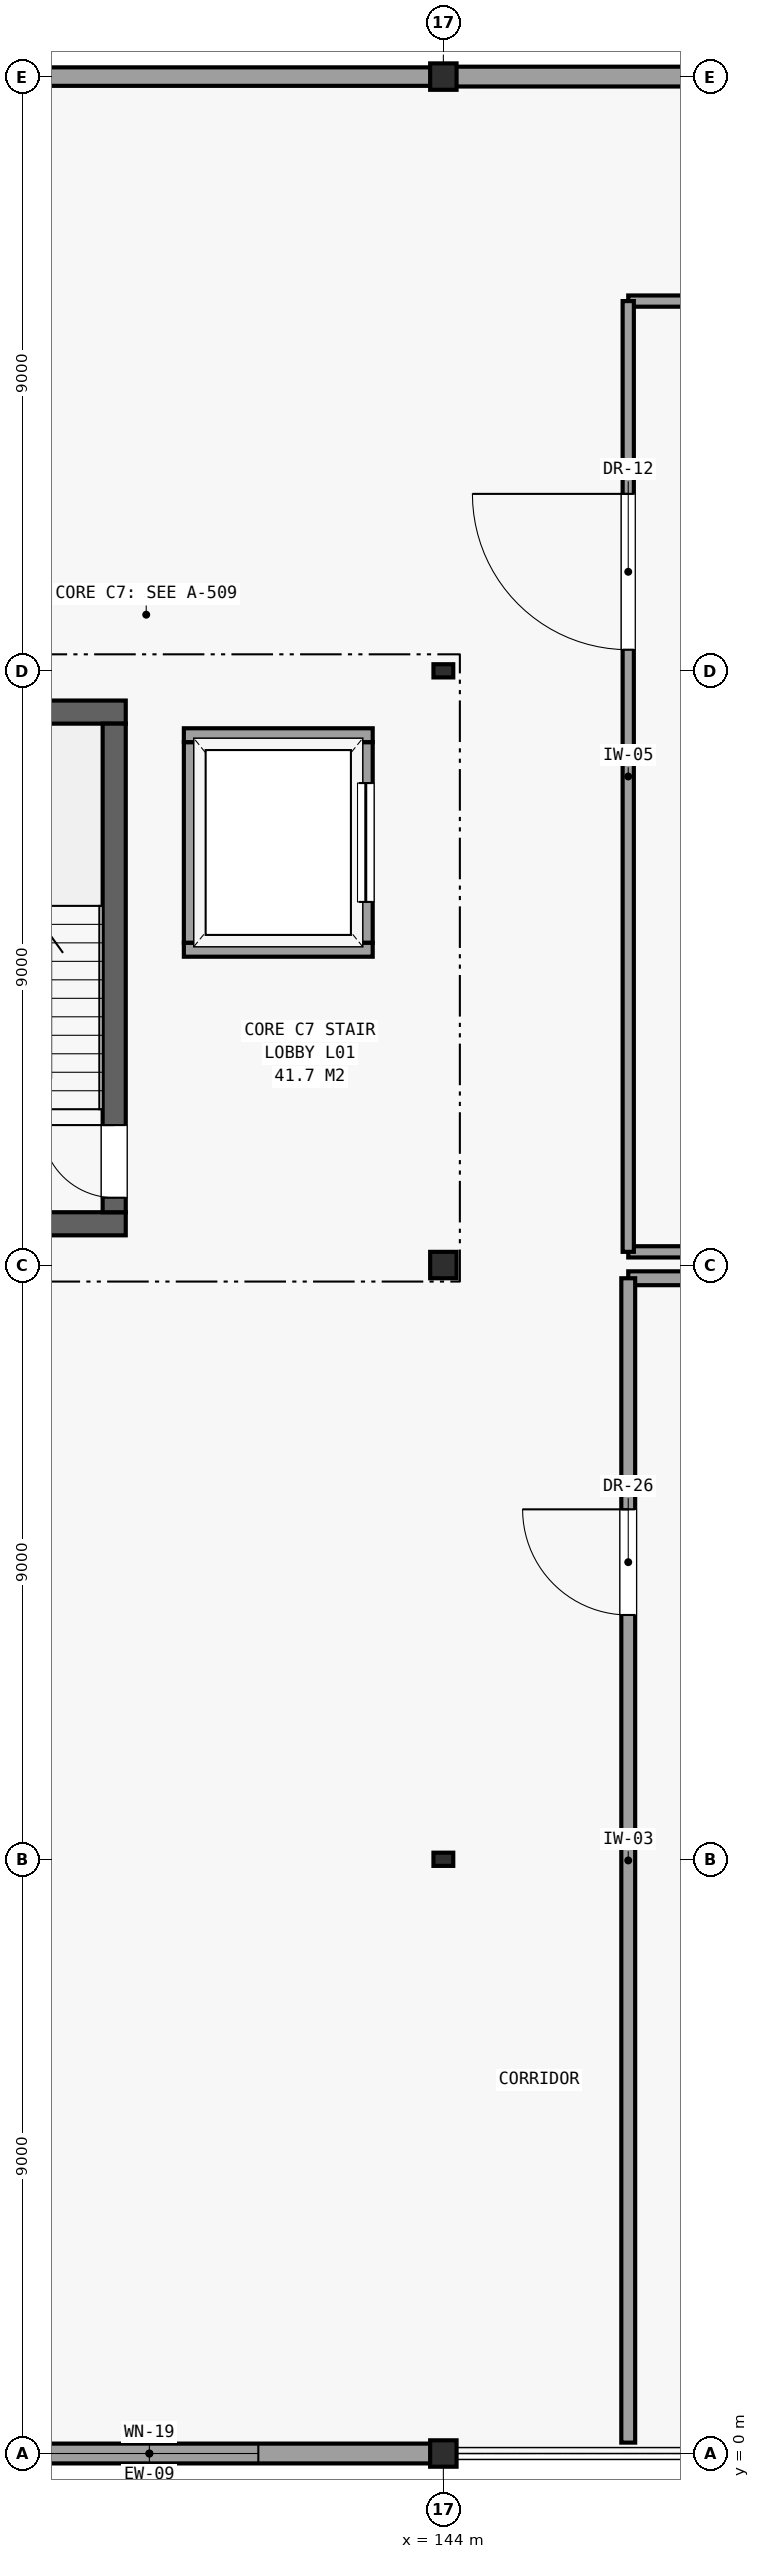
"""IFC4 building model, lengths in metres.
Left out: names, types, materials, properties, quantities, classifications, styles, units other than length and angle.
Written with IfcOpenShell. Run it as: python <this file> out.ifc"""

import sys

from ifc_helpers import new_model, si_unit, direction, frame, frame_2d, origin, origin_2d, place, context, subcontext, project, spatial, rectangle, hollow_rectangle, i_section, extrude, element, fill, save


model = new_model("IFC4")
c1 = context("Model", 3, precision=1e-05, world=origin(), true_north=direction((0.0, 1.0)))
c2 = subcontext(c1, "Body", "Model", "MODEL_VIEW")
j1 = project(units=[si_unit("LENGTHUNIT", "METRE"), si_unit("PLANEANGLEUNIT", "RADIAN")], contexts=[c1])
p1 = place(None, origin())
s1 = spatial("IfcSite", under=j1, at=p1, CompositionType="ELEMENT")
p2 = place(p1, origin())
s2 = spatial("IfcBuilding", under=s1, at=p2, CompositionType="ELEMENT")
p3 = place(p2, frame((0.0, 0.0, 5.1)))
s3 = spatial("IfcBuildingStorey", under=s2, at=p3, CompositionType="ELEMENT", Elevation=5.1)
p4 = place(p3, frame((144.0, 0.0, 0.0), z_axis=(0.0, 0.0, 1.0), x_axis=(1.0, 0.0, 0.0)))
e1 = element("IfcColumn", 1, at=p4, inside=s3, PredefinedType="COLUMN", context=c2, shape_type="SweptSolid", body=[
    extrude(i_section(OverallWidth=0.4, OverallDepth=0.4, WebThickness=0.013, FlangeThickness=0.021, FilletRadius=0.016, at=origin_2d()), origin(), (0.0, 0.0, 1.0), 4.14),
])
p5 = place(p3, frame((144.0, 9.0, 0.0), z_axis=(0.0, 0.0, 1.0), x_axis=(1.0, 0.0, 0.0)))
e2 = element("IfcColumn", 2, at=p5, inside=s3, PredefinedType="COLUMN", context=c2, shape_type="SweptSolid", body=[
    extrude(hollow_rectangle(XDim=0.2, YDim=0.3, WallThickness=0.012, at=origin_2d()), origin(), (0.0, 0.0, 1.0), 4.2),
])
p6 = place(p3, frame((144.0, 18.0, 0.0), z_axis=(0.0, 0.0, 1.0), x_axis=(1.0, 0.0, 0.0)))
e3 = element("IfcColumn", 3, at=p6, inside=s3, PredefinedType="COLUMN", context=c2, shape_type="SweptSolid", body=[
    extrude(i_section(OverallWidth=0.4, OverallDepth=0.4, WebThickness=0.013, FlangeThickness=0.021, FilletRadius=0.016, at=origin_2d()), origin(), (0.0, 0.0, 1.0), 4.2),
])
p7 = place(p3, frame((144.0, 27.0, 0.0), z_axis=(0.0, 0.0, 1.0), x_axis=(1.0, 0.0, 0.0)))
e4 = element("IfcColumn", 4, at=p7, inside=s3, PredefinedType="COLUMN", context=c2, shape_type="SweptSolid", body=[
    extrude(hollow_rectangle(XDim=0.2, YDim=0.3, WallThickness=0.012, at=origin_2d()), origin(), (0.0, 0.0, 1.0), 4.2),
])
p8 = place(p3, frame((144.0, 36.0, 0.0), z_axis=(0.0, 0.0, 1.0), x_axis=(1.0, 0.0, 0.0)))
e5 = element("IfcColumn", 5, at=p8, inside=s3, PredefinedType="COLUMN", context=c2, shape_type="SweptSolid", body=[
    extrude(i_section(OverallWidth=0.4, OverallDepth=0.4, WebThickness=0.013, FlangeThickness=0.021, FilletRadius=0.016, at=origin_2d()), origin(), (0.0, 0.0, 1.0), 4.2),
])
p9 = place(p3, frame((135.1, 0.0, 0.0), z_axis=(0.0, 0.0, 1.0), x_axis=(1.0, 0.0, 0.0)))
e6 = element("IfcWall", 6, at=p9, inside=s3, PredefinedType="SOLIDWALL", context=c2, shape_type="SweptSolid", body=[
    extrude(rectangle(XDim=8.896, YDim=0.3, at=frame_2d((4.448, 0.0))), origin(), (0.0, 0.0, 1.0), 3.29),
])
p10 = place(p9, frame((2.798, 0.0, 0.95)))
e7 = element("IfcOpeningElement", 7, at=p10, cuts=e6, PredefinedType="OPENING", context=c2, shape_type="SweptSolid", body=[
    extrude(rectangle(XDim=3.3, YDim=1.4, at=frame_2d((1.65, 0.7))), frame((0.0, 0.161, 0.0), z_axis=(0.0, -1.0, 0.0), x_axis=(1.0, 0.0, 0.0)), (0.0, 0.0, 1.0), 0.322),
])
p11 = place(p3, frame((152.9, 36.0, 0.0), z_axis=(0.0, 0.0, 1.0), x_axis=(-1.0, 0.0, 0.0)))
e8 = element("IfcWall", 8, at=p11, inside=s3, PredefinedType="SOLIDWALL", context=c2, shape_type="SweptSolid", body=[
    extrude(rectangle(XDim=8.896, YDim=0.3, at=frame_2d((4.448, 0.0))), origin(), (0.0, 0.0, 1.0), 3.3),
])
p12 = place(p3, frame((143.996, 36.0, 0.0), z_axis=(0.0, 0.0, 1.0), x_axis=(-1.0, 0.0, 0.0)))
e9 = element("IfcWall", 9, at=p12, inside=s3, PredefinedType="SOLIDWALL", context=c2, shape_type="SweptSolid", body=[
    extrude(rectangle(XDim=8.896, YDim=0.28, at=frame_2d((4.448, 0.0))), origin(), (0.0, 0.0, 1.0), 3.3),
])
for number, where, z_axis, x_axis in (
    (10, (135.21, 18.625, 0.0), (0.0, 0.0, 1.0), (1.0, 0.0, 0.0)),
    (11, (135.21, 26.375, 0.0), (0.0, 0.0, 1.0), (1.0, 0.0, 0.0)),
):
    element("IfcWall", number, at=place(p3, frame(where, z_axis=z_axis, x_axis=x_axis)), inside=s3, PredefinedType="SHEAR", context=c2, shape_type="SweptSolid", body=[
        extrude(rectangle(XDim=3.98, YDim=0.35, at=frame_2d((1.99, 0.0))), origin(), (0.0, 0.0, 1.0), 3.95),
    ])
p13 = place(p3, frame((139.015, 18.8, 0.0), z_axis=(0.0, 0.0, 1.0), x_axis=(0.0, 1.0, 0.0)))
e12 = element("IfcWall", 12, at=p13, inside=s3, PredefinedType="SHEAR", context=c2, shape_type="SweptSolid", body=[
    extrude(rectangle(XDim=7.4, YDim=0.35, at=frame_2d((3.7, 0.0))), origin(), (0.0, 0.0, 1.0), 3.95),
])
p14 = place(p13, frame((0.22, 0.0, 0.0)))
e13 = element("IfcOpeningElement", 13, at=p14, cuts=e12, PredefinedType="OPENING", context=c2, shape_type="SweptSolid", body=[
    extrude(rectangle(XDim=1.1, YDim=2.15, at=frame_2d((0.55, 1.075))), frame((0.0, 0.186, 0.0), z_axis=(0.0, -1.0, 0.0), x_axis=(1.0, 0.0, 0.0)), (0.0, 0.0, 1.0), 0.372),
])
p15 = place(p3, frame((142.825, 22.88, 0.0), z_axis=(0.0, 0.0, 1.0), x_axis=(0.0, 1.0, 0.0)))
e14 = element("IfcWall", 14, at=p15, inside=s3, PredefinedType="PARTITIONING", context=c2, shape_type="SweptSolid", body=[
    extrude(rectangle(XDim=3.04, YDim=0.21, at=frame_2d((1.52, 0.0))), origin(), (0.0, 0.0, 1.0), 3.95),
])
p16 = place(p15, frame((0.62, 0.0, 0.0)))
e15 = element("IfcOpeningElement", 15, at=p16, cuts=e14, PredefinedType="OPENING", context=c2, shape_type="SweptSolid", body=[
    extrude(rectangle(XDim=1.8, YDim=2.4, at=frame_2d((0.9, 1.2))), frame((0.0, 0.116, 0.0), z_axis=(0.0, -1.0, 0.0), x_axis=(1.0, 0.0, 0.0)), (0.0, 0.0, 1.0), 0.232),
])
p17 = place(p3, frame((140.175, 22.88, 0.0), z_axis=(0.0, 0.0, 1.0), x_axis=(0.0, 1.0, 0.0)))
e16 = element("IfcWall", 16, at=p17, inside=s3, PredefinedType="PARTITIONING", context=c2, shape_type="SweptSolid", body=[
    extrude(rectangle(XDim=3.04, YDim=0.21, at=frame_2d((1.52, 0.0))), origin(), (0.0, 0.0, 1.0), 3.95),
])
for number, where, z_axis, x_axis in (
    (17, (140.07, 22.775, 0.0), (0.0, 0.0, 1.0), (1.0, 0.0, 0.0)),
    (18, (140.07, 26.025, 0.0), (0.0, 0.0, 1.0), (1.0, 0.0, 0.0)),
):
    element("IfcWall", number, at=place(p3, frame(where, z_axis=z_axis, x_axis=x_axis)), inside=s3, PredefinedType="PARTITIONING", context=c2, shape_type="SweptSolid", body=[
        extrude(rectangle(XDim=2.86, YDim=0.21, at=frame_2d((1.43, 0.0))), origin(), (0.0, 0.0, 1.0), 3.95),
    ])
p18 = place(p3, frame((146.8, 18.2, 0.0), z_axis=(0.0, 0.0, 1.0), x_axis=(1.0, 0.0, 0.0)))
e19 = element("IfcWall", 19, at=p18, inside=s3, PredefinedType="PARTITIONING", context=c2, shape_type="SweptSolid", body=[
    extrude(rectangle(XDim=6.1, YDim=0.17, at=frame_2d((3.05, 0.0))), origin(), (0.0, 0.0, 1.0), 3.3),
])
p19 = place(p3, frame((146.8, 32.6, 0.0), z_axis=(0.0, 0.0, 1.0), x_axis=(1.0, 0.0, 0.0)))
e20 = element("IfcWall", 20, at=p19, inside=s3, PredefinedType="PARTITIONING", context=c2, shape_type="SweptSolid", body=[
    extrude(rectangle(XDim=14.8, YDim=0.17, at=frame_2d((7.4, 0.0))), origin(), (0.0, 0.0, 1.0), 3.3),
])
p20 = place(p3, frame((146.8, 18.2, 0.0), z_axis=(0.0, 0.0, 1.0), x_axis=(0.0, 1.0, 0.0)))
e21 = element("IfcWall", 21, at=p20, inside=s3, PredefinedType="PARTITIONING", context=c2, shape_type="SweptSolid", body=[
    extrude(rectangle(XDim=14.4, YDim=0.17, at=frame_2d((7.2, 0.0))), origin(), (0.0, 0.0, 1.0), 3.35),
])
p21 = place(p20, frame((9.12, 0.0, 0.0)))
e22 = element("IfcOpeningElement", 22, at=p21, cuts=e21, PredefinedType="OPENING", context=c2, shape_type="SweptSolid", body=[
    extrude(rectangle(XDim=2.36, YDim=2.879, at=frame_2d((1.18, 1.439))), frame((0.0, 0.096, 0.0), z_axis=(0.0, -1.0, 0.0), x_axis=(1.0, 0.0, 0.0)), (0.0, 0.0, 1.0), 0.192),
])
p22 = place(p3, frame((146.8, 17.8, 0.0), z_axis=(0.0, 0.0, 1.0), x_axis=(1.0, 0.0, 0.0)))
e23 = element("IfcWall", 23, at=p22, inside=s3, PredefinedType="PARTITIONING", context=c2, shape_type="SweptSolid", body=[
    extrude(rectangle(XDim=6.1, YDim=0.21, at=frame_2d((3.05, 0.0))), origin(), (0.0, 0.0, 1.0), 3.29),
])
p23 = place(p3, frame((146.8, 0.165, 0.0), z_axis=(0.0, 0.0, 1.0), x_axis=(0.0, 1.0, 0.0)))
e24 = element("IfcWall", 24, at=p23, inside=s3, PredefinedType="PARTITIONING", context=c2, shape_type="SweptSolid", body=[
    extrude(rectangle(XDim=17.635, YDim=0.21, at=frame_2d((8.817, 0.0))), origin(), (0.0, 0.0, 1.0), 3.34),
])
p24 = place(p23, frame((12.535, 0.0, 0.0)))
e25 = element("IfcOpeningElement", 25, at=p24, cuts=e24, PredefinedType="OPENING", context=c2, shape_type="SweptSolid", body=[
    extrude(rectangle(XDim=1.6, YDim=2.3, at=frame_2d((0.8, 1.15))), frame((0.0, 0.116, 0.0), z_axis=(0.0, -1.0, 0.0), x_axis=(1.0, 0.0, 0.0)), (0.0, 0.0, 1.0), 0.232),
])
p25 = place(p10, origin())
e26 = element("IfcWindow", 26, at=p25, inside=s3, PartitioningType="SINGLE_PANEL", PredefinedType="WINDOW", context=c2, shape_type="SweptSolid", body=[
    extrude(rectangle(XDim=3.3, YDim=1.4, at=frame_2d((1.65, 0.7))), frame((0.0, 0.03, 0.0), z_axis=(0.0, -1.0, 0.0), x_axis=(1.0, 0.0, 0.0)), (0.0, 0.0, 1.0), 0.06),
])
fill(e7, e26)
p26 = place(p14, origin())
e27 = element("IfcDoor", 27, at=p26, inside=s3, OperationType="SINGLE_SWING_RIGHT", PredefinedType="DOOR", context=c2, shape_type="SweptSolid", body=[
    extrude(rectangle(XDim=1.1, YDim=2.15, at=frame_2d((0.55, 1.075))), frame((0.0, 0.025, 0.0), z_axis=(0.0, -1.0, 0.0), x_axis=(1.0, 0.0, 0.0)), (0.0, 0.0, 1.0), 0.05),
])
fill(e13, e27)
p27 = place(p16, origin())
e28 = element("IfcDoor", 28, at=p27, inside=s3, OperationType="SLIDING_TO_LEFT", PredefinedType="DOOR", context=c2, shape_type="SweptSolid", body=[
    extrude(rectangle(XDim=1.8, YDim=2.4, at=frame_2d((0.9, 1.2))), frame((0.0, 0.025, 0.0), z_axis=(0.0, -1.0, 0.0), x_axis=(1.0, 0.0, 0.0)), (0.0, 0.0, 1.0), 0.05),
])
fill(e15, e28)
p28 = place(p21, origin())
e29 = element("IfcDoor", 29, at=p28, inside=s3, OperationType="SINGLE_SWING_RIGHT", PredefinedType="DOOR", context=c2, shape_type="SweptSolid", body=[
    extrude(rectangle(XDim=2.36, YDim=2.879, at=frame_2d((1.18, 1.439))), frame((0.0, 0.025, 0.0), z_axis=(0.0, -1.0, 0.0), x_axis=(1.0, 0.0, 0.0)), (0.0, 0.0, 1.0), 0.05),
])
fill(e22, e29)
p29 = place(p24, origin())
e30 = element("IfcDoor", 30, at=p29, inside=s3, OperationType="SINGLE_SWING_RIGHT", PredefinedType="DOOR", context=c2, shape_type="SweptSolid", body=[
    extrude(rectangle(XDim=1.6, YDim=2.3, at=frame_2d((0.8, 1.15))), frame((0.0, 0.025, 0.0), z_axis=(0.0, -1.0, 0.0), x_axis=(1.0, 0.0, 0.0)), (0.0, 0.0, 1.0), 0.05),
])
fill(e25, e30)
save(model, sys.argv[1])
